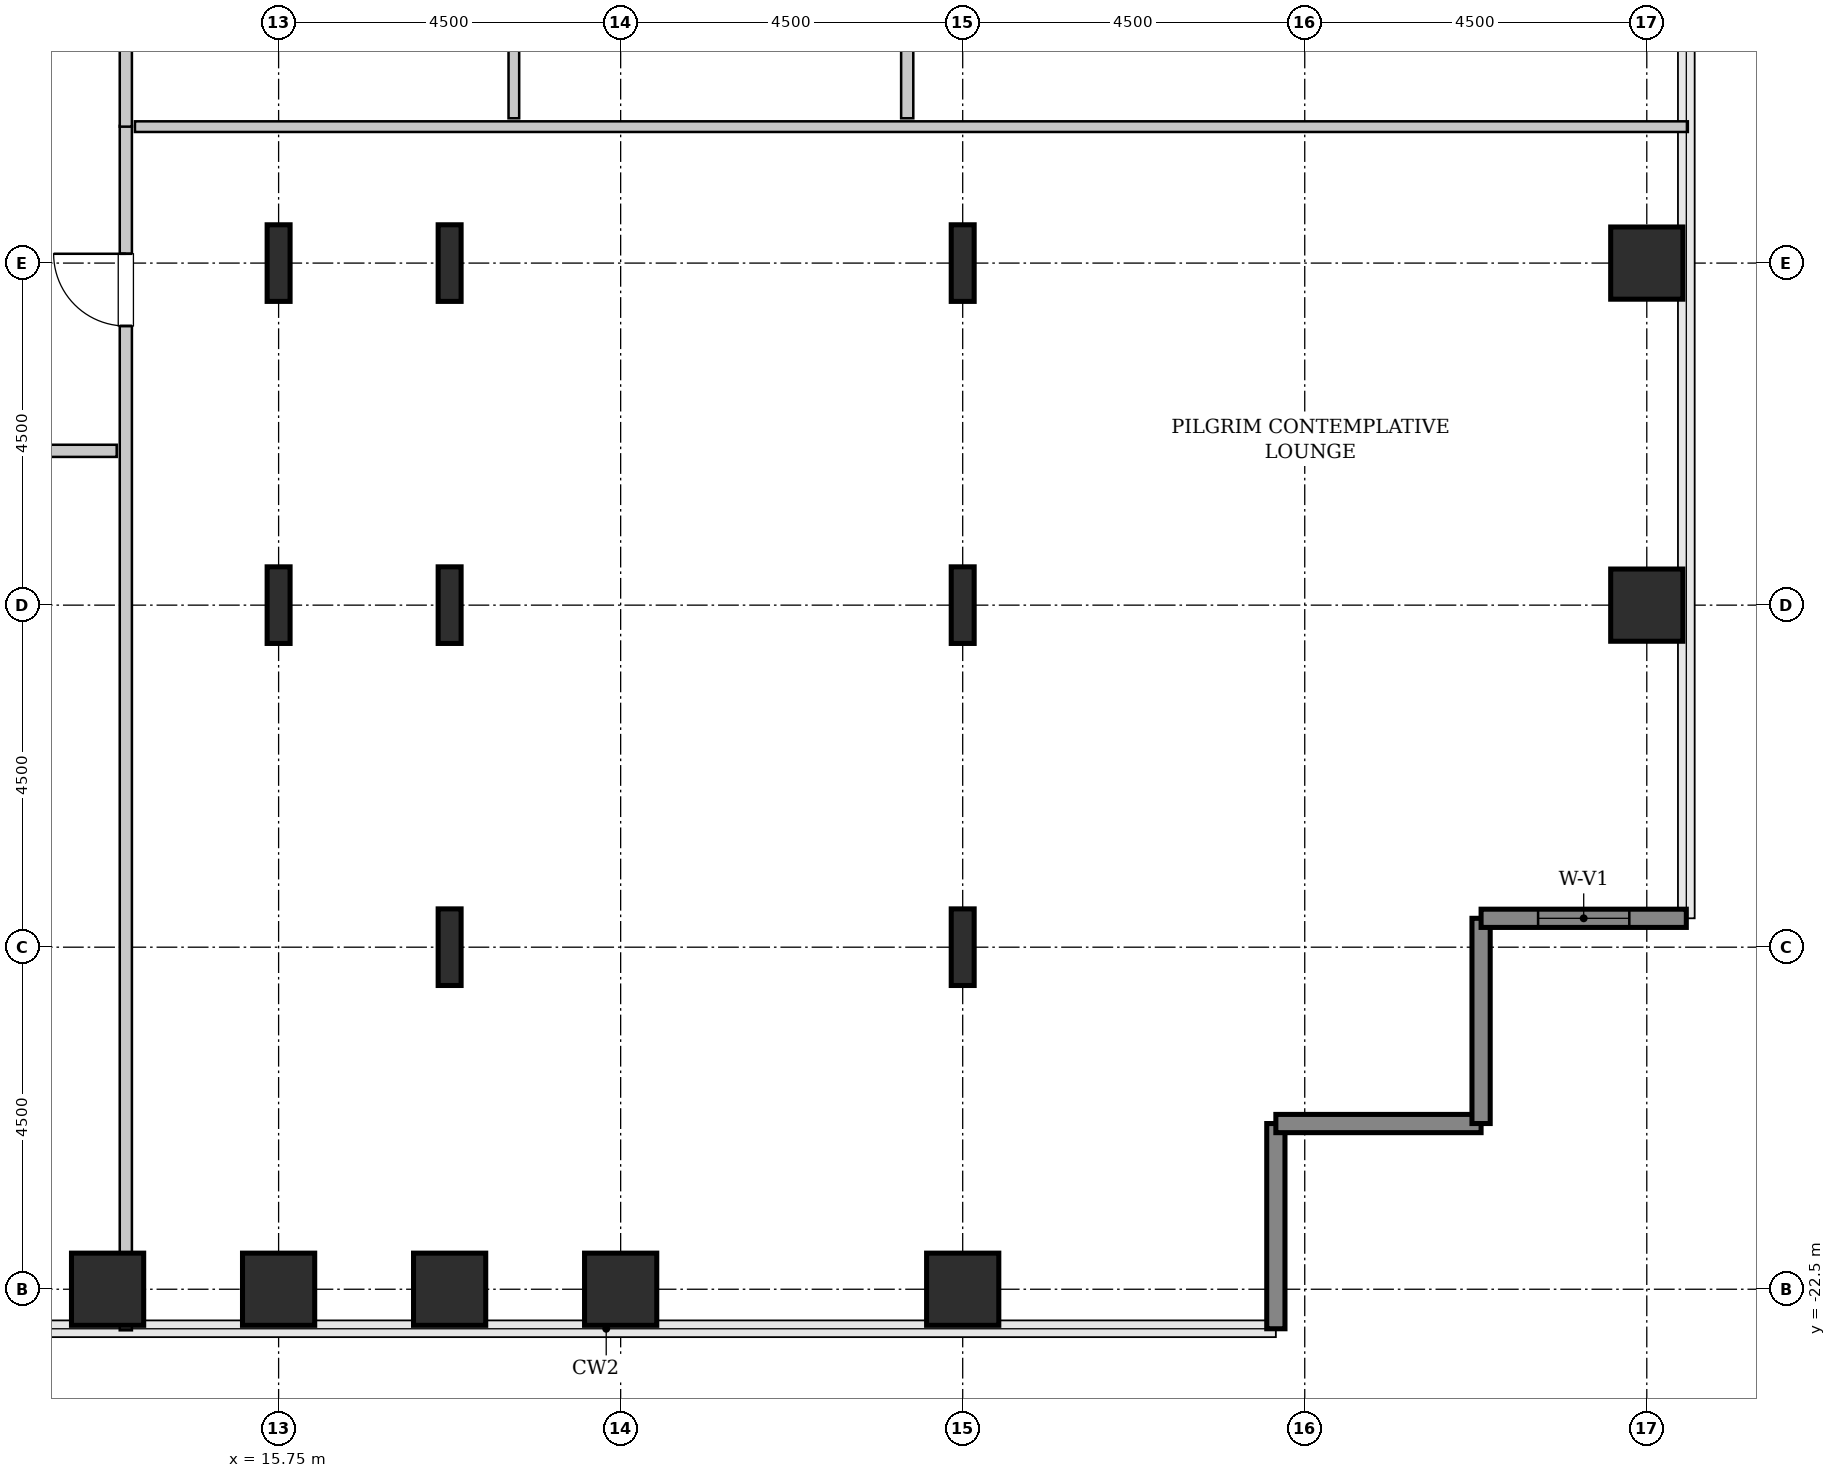
"""IFC4 building model, lengths in metres.
Left out: names, types, materials, properties, quantities, classifications, styles, units other than length and angle.
Written with IfcOpenShell. Run it as: python <this file> out.ifc"""

import sys

from ifc_helpers import new_model, si_unit, direction, frame, frame_2d, origin, origin_2d, place, context, subcontext, project, spatial, rectangle, hollow_rectangle, i_section, extrude, source, transform, mapped, element, fill, save


model = new_model("IFC4")
c1 = context("Model", 3, precision=1e-05, world=origin(), true_north=direction((0.0, 1.0)))
c2 = subcontext(c1, "Body", "Model", "MODEL_VIEW")
j1 = project(units=[si_unit("LENGTHUNIT", "METRE"), si_unit("PLANEANGLEUNIT", "RADIAN")], contexts=[c1])
p1 = place(None, origin())
s1 = spatial("IfcSite", under=j1, at=p1, CompositionType="ELEMENT")
p2 = place(p1, origin())
s2 = spatial("IfcBuilding", under=s1, at=p2, CompositionType="ELEMENT")
p3 = place(p2, frame((0.0, 0.0, 48.2)))
s3 = spatial("IfcBuildingStorey", under=s2, at=p3, CompositionType="ELEMENT", Elevation=48.2)
m1 = source(origin(), c2, "Body", "SweptSolid", [
    extrude(hollow_rectangle(XDim=0.95, YDim=0.95, WallThickness=0.045, InnerFilletRadius=0.045, OuterFilletRadius=0.09, at=origin_2d()), origin(), (0.0, 0.0, 1.0), 3.8),
])
for number, where, z_axis, x_axis in (
    (1, (13.5, -22.5, 0.0), (0.0, 0.0, 1.0), (1.0, 0.0, 0.0)),
    (2, (15.75, -22.5, 0.0), (0.0, 0.0, 1.0), (1.0, 0.0, 0.0)),
):
    element("IfcColumn", number, at=place(p3, frame(where, z_axis=z_axis, x_axis=x_axis)), inside=s3, PredefinedType="COLUMN", context=c2, shape_type="MappedRepresentation", body=[
        mapped(m1, transform((0.0, 0.0, 0.0), x_axis=(1.0, 0.0, 0.0), y_axis=(0.0, 1.0, 0.0), z_axis=(0.0, 0.0, 1.0), scale=1.0)),
    ])
m2 = source(origin(), c2, "Body", "SweptSolid", [
    extrude(i_section(OverallWidth=0.302, OverallDepth=1.008, WebThickness=0.021, FlangeThickness=0.04, FilletRadius=0.03, at=origin_2d()), origin(), (0.0, 0.0, 1.0), 3.8),
])
for number, where, z_axis, x_axis in (
    (3, (15.75, -13.5, 0.0), (0.0, 0.0, 1.0), (1.0, 0.0, 0.0)),
    (4, (15.75, -9.0, 0.0), (0.0, 0.0, 1.0), (1.0, 0.0, 0.0)),
):
    element("IfcColumn", number, at=place(p3, frame(where, z_axis=z_axis, x_axis=x_axis)), inside=s3, PredefinedType="COLUMN", context=c2, shape_type="MappedRepresentation", body=[
        mapped(m2, transform((0.0, 0.0, 0.0), x_axis=(1.0, 0.0, 0.0), y_axis=(0.0, 1.0, 0.0), z_axis=(0.0, 0.0, 1.0), scale=1.0)),
    ])
p4 = place(p3, frame((18.0, -22.5, 0.0), z_axis=(0.0, 0.0, 1.0), x_axis=(1.0, 0.0, 0.0)))
e5 = element("IfcColumn", 5, at=p4, inside=s3, PredefinedType="COLUMN", context=c2, shape_type="MappedRepresentation", body=[
    mapped(m1, transform((0.0, 0.0, 0.0), x_axis=(1.0, 0.0, 0.0), y_axis=(0.0, 1.0, 0.0), z_axis=(0.0, 0.0, 1.0), scale=1.0)),
])
for number, where, z_axis, x_axis in (
    (6, (18.0, -18.0, 0.0), (0.0, 0.0, 1.0), (1.0, 0.0, 0.0)),
    (7, (18.0, -13.5, 0.0), (0.0, 0.0, 1.0), (1.0, 0.0, 0.0)),
    (8, (18.0, -9.0, 0.0), (0.0, 0.0, 1.0), (1.0, 0.0, 0.0)),
):
    element("IfcColumn", number, at=place(p3, frame(where, z_axis=z_axis, x_axis=x_axis)), inside=s3, PredefinedType="COLUMN", context=c2, shape_type="MappedRepresentation", body=[
        mapped(m2, transform((0.0, 0.0, 0.0), x_axis=(1.0, 0.0, 0.0), y_axis=(0.0, 1.0, 0.0), z_axis=(0.0, 0.0, 1.0), scale=1.0)),
    ])
for number, where, z_axis, x_axis in (
    (9, (20.25, -22.5, 0.0), (0.0, 0.0, 1.0), (1.0, 0.0, 0.0)),
    (10, (24.75, -22.5, 0.0), (0.0, 0.0, 1.0), (1.0, 0.0, 0.0)),
):
    element("IfcColumn", number, at=place(p3, frame(where, z_axis=z_axis, x_axis=x_axis)), inside=s3, PredefinedType="COLUMN", context=c2, shape_type="MappedRepresentation", body=[
        mapped(m1, transform((0.0, 0.0, 0.0), x_axis=(1.0, 0.0, 0.0), y_axis=(0.0, 1.0, 0.0), z_axis=(0.0, 0.0, 1.0), scale=1.0)),
    ])
for number, where, z_axis, x_axis in (
    (11, (24.75, -18.0, 0.0), (0.0, 0.0, 1.0), (1.0, 0.0, 0.0)),
    (12, (24.75, -13.5, 0.0), (0.0, 0.0, 1.0), (1.0, 0.0, 0.0)),
    (13, (24.75, -9.0, 0.0), (0.0, 0.0, 1.0), (1.0, 0.0, 0.0)),
):
    element("IfcColumn", number, at=place(p3, frame(where, z_axis=z_axis, x_axis=x_axis)), inside=s3, PredefinedType="COLUMN", context=c2, shape_type="MappedRepresentation", body=[
        mapped(m2, transform((0.0, 0.0, 0.0), x_axis=(1.0, 0.0, 0.0), y_axis=(0.0, 1.0, 0.0), z_axis=(0.0, 0.0, 1.0), scale=1.0)),
    ])
for number, where, z_axis, x_axis in (
    (14, (33.75, -13.5, 0.0), (0.0, 0.0, 1.0), (1.0, 0.0, 0.0)),
    (15, (33.75, -9.0, 0.0), (0.0, 0.0, 1.0), (1.0, 0.0, 0.0)),
):
    element("IfcColumn", number, at=place(p3, frame(where, z_axis=z_axis, x_axis=x_axis)), inside=s3, PredefinedType="COLUMN", context=c2, shape_type="MappedRepresentation", body=[
        mapped(m1, transform((0.0, 0.0, 0.0), x_axis=(1.0, 0.0, 0.0), y_axis=(0.0, 1.0, 0.0), z_axis=(0.0, 0.0, 1.0), scale=1.0)),
    ])
m3 = source(origin(), c2, "Body", "SweptSolid", [
    extrude(rectangle(XDim=2.7, YDim=0.24, at=frame_2d((1.35, 0.0))), origin(), (0.0, 0.0, 1.0), 3.55),
])
for number, where, z_axis, x_axis in (
    (16, (28.87, -23.02, 0.0), (0.0, 0.0, 1.0), (0.0, 1.0, 0.0)),
    (17, (28.87, -20.32, 0.0), (0.0, 0.0, 1.0), (1.0, 0.0, 0.0)),
    (18, (31.57, -20.32, 0.0), (0.0, 0.0, 1.0), (0.0, 1.0, 0.0)),
):
    element("IfcWall", number, at=place(p3, frame(where, z_axis=z_axis, x_axis=x_axis)), inside=s3, PredefinedType="SHEAR", context=c2, shape_type="MappedRepresentation", body=[
        mapped(m3, transform((0.0, 0.0, 0.0), x_axis=(1.0, 0.0, 0.0), y_axis=(0.0, 1.0, 0.0), z_axis=(0.0, 0.0, 1.0), scale=1.0)),
    ])
p5 = place(p3, frame((31.57, -17.62, 0.0), z_axis=(0.0, 0.0, 1.0), x_axis=(1.0, 0.0, 0.0)))
e19 = element("IfcWall", 19, at=p5, inside=s3, PredefinedType="SHEAR", context=c2, shape_type="MappedRepresentation", body=[
    mapped(m3, transform((0.0, 0.0, 0.0), x_axis=(1.0, 0.0, 0.0), y_axis=(0.0, 1.0, 0.0), z_axis=(0.0, 0.0, 1.0), scale=1.0)),
])
p6 = place(p5, frame((0.75, 0.0, 0.85)))
e20 = element("IfcOpeningElement", 20, at=p6, cuts=e19, PredefinedType="OPENING", context=c2, shape_type="SweptSolid", body=[
    extrude(rectangle(XDim=1.2, YDim=1.8, at=frame_2d((0.6, 0.9))), frame((0.0, 0.13, 0.0), z_axis=(0.0, -1.0, 0.0), x_axis=(1.0, 0.0, 0.0)), (0.0, 0.0, 1.0), 0.26),
])
m4 = source(origin(), c2, "Body", "SweptSolid", [
    extrude(rectangle(XDim=15.845, YDim=0.16, at=frame_2d((7.922, 0.0))), origin(), (0.0, 0.0, 1.0), 3.535),
])
p7 = place(p3, frame((13.74, -23.04, 0.0), z_axis=(0.0, 0.0, 1.0), x_axis=(0.0, 1.0, 0.0)))
e21 = element("IfcWall", 21, at=p7, inside=s3, PredefinedType="PARTITIONING", context=c2, shape_type="MappedRepresentation", body=[
    mapped(m4, transform((0.0, 0.0, 0.0), x_axis=(1.0, 0.0, 0.0), y_axis=(0.0, 1.0, 0.0), z_axis=(0.0, 0.0, 1.0), scale=1.0)),
])
p8 = place(p7, frame((13.212, 0.0, 0.0)))
e22 = element("IfcOpeningElement", 22, at=p8, cuts=e21, PredefinedType="OPENING", context=c2, shape_type="SweptSolid", body=[
    extrude(rectangle(XDim=0.95, YDim=2.1, at=frame_2d((0.475, 1.05))), frame((0.0, 0.09, 0.0), z_axis=(0.0, -1.0, 0.0), x_axis=(1.0, 0.0, 0.0)), (0.0, 0.0, 1.0), 0.18),
])
m5 = source(origin(), c2, "Body", "SweptSolid", [
    extrude(rectangle(XDim=20.43, YDim=0.14, at=frame_2d((10.215, 0.0))), origin(), (0.0, 0.0, 1.0), 3.535),
])
p9 = place(p3, frame((13.86, -7.205, 0.0), z_axis=(0.0, 0.0, 1.0), x_axis=(1.0, 0.0, 0.0)))
e23 = element("IfcWall", 23, at=p9, inside=s3, PredefinedType="PARTITIONING", context=c2, shape_type="MappedRepresentation", body=[
    mapped(m5, transform((0.0, 0.0, 0.0), x_axis=(1.0, 0.0, 0.0), y_axis=(0.0, 1.0, 0.0), z_axis=(0.0, 0.0, 1.0), scale=1.0)),
])
m6 = source(origin(), c2, "Body", "SweptSolid", [
    extrude(rectangle(XDim=13.3, YDim=0.16, at=frame_2d((6.65, 0.0))), origin(), (0.0, 0.0, 1.0), 3.535),
])
p10 = place(p3, frame((24.02, -7.095, 0.0), z_axis=(0.0, 0.0, 1.0), x_axis=(0.0, 1.0, 0.0)))
e24 = element("IfcWall", 24, at=p10, inside=s3, PredefinedType="PARTITIONING", context=c2, shape_type="MappedRepresentation", body=[
    mapped(m6, transform((0.0, 0.0, 0.0), x_axis=(1.0, 0.0, 0.0), y_axis=(0.0, 1.0, 0.0), z_axis=(0.0, 0.0, 1.0), scale=1.0)),
])
p11 = place(p10, frame((8.87, 0.0, 0.0)))
e25 = element("IfcOpeningElement", 25, at=p11, cuts=e24, PredefinedType="OPENING", context=c2, shape_type="SweptSolid", body=[
    extrude(rectangle(XDim=0.95, YDim=2.1, at=frame_2d((0.475, 1.05))), frame((0.0, 0.09, 0.0), z_axis=(0.0, -1.0, 0.0), x_axis=(1.0, 0.0, 0.0)), (0.0, 0.0, 1.0), 0.18),
])
m7 = source(origin(), c2, "Body", "SweptSolid", [
    extrude(rectangle(XDim=8.595, YDim=0.16, at=frame_2d((4.297, 0.0))), origin(), (0.0, 0.0, 1.0), 3.535),
])
p12 = place(p3, frame((13.74, -7.205, 0.0), z_axis=(0.0, 0.0, 1.0), x_axis=(0.0, 1.0, 0.0)))
e26 = element("IfcWall", 26, at=p12, inside=s3, PredefinedType="PARTITIONING", context=c2, shape_type="MappedRepresentation", body=[
    mapped(m7, transform((0.0, 0.0, 0.0), x_axis=(1.0, 0.0, 0.0), y_axis=(0.0, 1.0, 0.0), z_axis=(0.0, 0.0, 1.0), scale=1.0)),
])
p13 = place(p12, frame((3.823, 0.0, 0.0)))
e27 = element("IfcOpeningElement", 27, at=p13, cuts=e26, PredefinedType="OPENING", context=c2, shape_type="SweptSolid", body=[
    extrude(rectangle(XDim=0.95, YDim=2.1, at=frame_2d((0.475, 1.05))), frame((0.0, 0.09, 0.0), z_axis=(0.0, -1.0, 0.0), x_axis=(1.0, 0.0, 0.0)), (0.0, 0.0, 1.0), 0.18),
])
m8 = source(origin(), c2, "Body", "SweptSolid", [
    extrude(rectangle(XDim=8.365, YDim=0.14, at=frame_2d((4.183, 0.0))), origin(), (0.0, 0.0, 1.0), 3.535),
])
p14 = place(p3, frame((18.845, -7.095, 0.0), z_axis=(0.0, 0.0, 1.0), x_axis=(0.0, 1.0, 0.0)))
e28 = element("IfcWall", 28, at=p14, inside=s3, PredefinedType="PARTITIONING", context=c2, shape_type="MappedRepresentation", body=[
    mapped(m8, transform((0.0, 0.0, 0.0), x_axis=(1.0, 0.0, 0.0), y_axis=(0.0, 1.0, 0.0), z_axis=(0.0, 0.0, 1.0), scale=1.0)),
])
m9 = source(origin(), c2, "Body", "SweptSolid", [
    extrude(rectangle(XDim=6.025, YDim=0.16, at=frame_2d((3.013, 0.0))), origin(), (0.0, 0.0, 1.0), 3.535),
])
p15 = place(p3, frame((7.595, -11.47, 0.0), z_axis=(0.0, 0.0, 1.0), x_axis=(1.0, 0.0, 0.0)))
e29 = element("IfcWall", 29, at=p15, inside=s3, PredefinedType="PARTITIONING", context=c2, shape_type="MappedRepresentation", body=[
    mapped(m9, transform((0.0, 0.0, 0.0), x_axis=(1.0, 0.0, 0.0), y_axis=(0.0, 1.0, 0.0), z_axis=(0.0, 0.0, 1.0), scale=1.0)),
])
p16 = place(p15, frame((2.538, 0.0, 0.0)))
e30 = element("IfcOpeningElement", 30, at=p16, cuts=e29, PredefinedType="OPENING", context=c2, shape_type="SweptSolid", body=[
    extrude(rectangle(XDim=0.95, YDim=2.1, at=frame_2d((0.475, 1.05))), frame((0.0, 0.09, 0.0), z_axis=(0.0, -1.0, 0.0), x_axis=(1.0, 0.0, 0.0)), (0.0, 0.0, 1.0), 0.18),
])
m10 = source(origin(), c2, "Body", "SweptSolid", [
    extrude(rectangle(XDim=1.2, YDim=1.8, at=frame_2d((0.6, 0.9))), frame((0.0, 0.03, 0.0), z_axis=(0.0, -1.0, 0.0), x_axis=(1.0, 0.0, 0.0)), (0.0, 0.0, 1.0), 0.06),
])
p17 = place(p6, origin())
e31 = element("IfcWindow", 31, at=p17, inside=s3, PartitioningType="SINGLE_PANEL", PredefinedType="WINDOW", context=c2, shape_type="MappedRepresentation", body=[
    mapped(m10, transform((0.0, 0.0, 0.0), x_axis=(1.0, 0.0, 0.0), y_axis=(0.0, 1.0, 0.0), z_axis=(0.0, 0.0, 1.0), scale=1.0)),
])
fill(e20, e31)
m11 = source(origin(), c2, "Body", "SweptSolid", [
    extrude(rectangle(XDim=0.95, YDim=2.1, at=frame_2d((0.475, 1.05))), frame((0.0, 0.025, 0.0), z_axis=(0.0, -1.0, 0.0), x_axis=(1.0, 0.0, 0.0)), (0.0, 0.0, 1.0), 0.05),
])
p18 = place(p8, origin())
e32 = element("IfcDoor", 32, at=p18, inside=s3, OperationType="SINGLE_SWING_RIGHT", PredefinedType="DOOR", context=c2, shape_type="MappedRepresentation", body=[
    mapped(m11, transform((0.0, 0.0, 0.0), x_axis=(1.0, 0.0, 0.0), y_axis=(0.0, 1.0, 0.0), z_axis=(0.0, 0.0, 1.0), scale=1.0)),
])
fill(e22, e32)
save(model, sys.argv[1])
